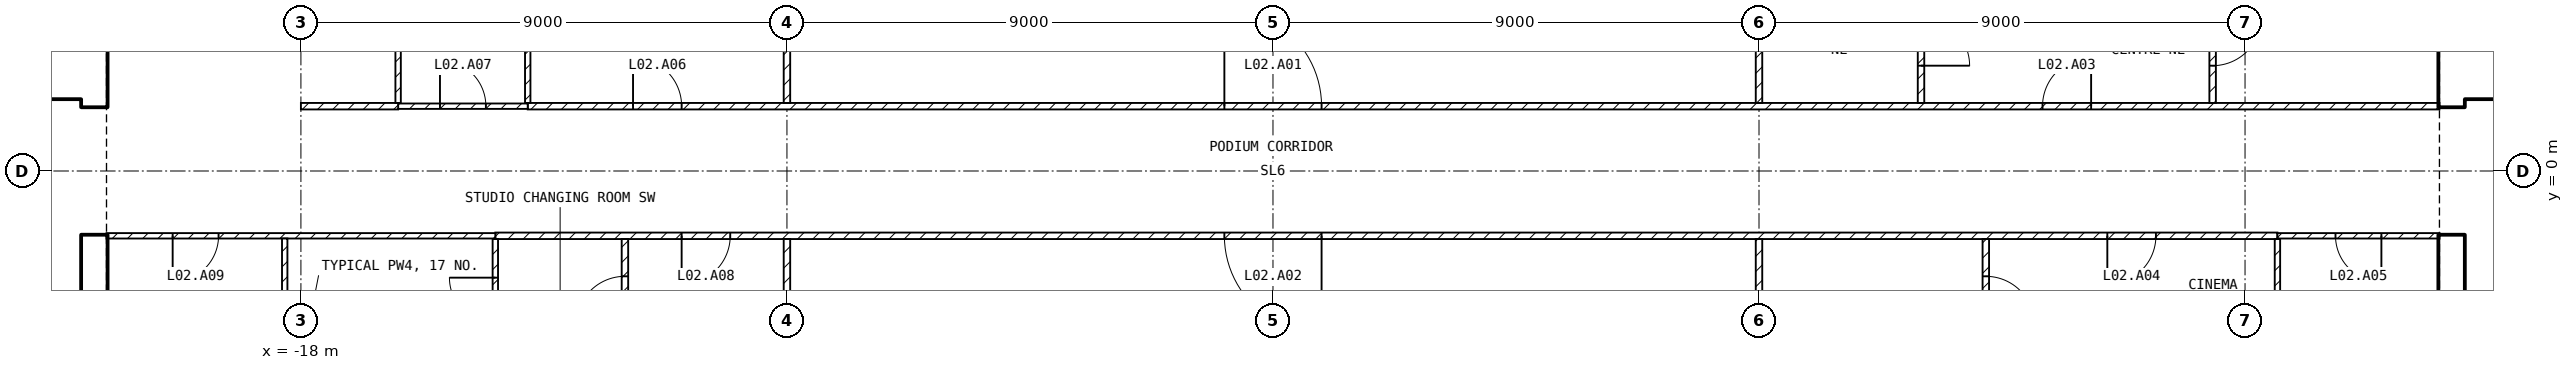
"""IFC4 building model, lengths in metres.
Left out: names, types, materials, properties, quantities, classifications, styles, units other than length and angle.
Written with IfcOpenShell. Run it as: python <this file> out.ifc"""

import sys

from ifc_helpers import new_model, si_unit, direction, frame, frame_2d, origin, place, context, subcontext, project, spatial, rectangle, extrude, element, fill, save


model = new_model("IFC4")
c1 = context("Model", 3, precision=1e-05, world=origin(), true_north=direction((0.0, 1.0)))
c2 = subcontext(c1, "Body", "Model", "MODEL_VIEW")
j1 = project(units=[si_unit("LENGTHUNIT", "METRE"), si_unit("PLANEANGLEUNIT", "RADIAN")], contexts=[c1])
p1 = place(None, origin())
s1 = spatial("IfcSite", under=j1, at=p1, CompositionType="ELEMENT")
p2 = place(p1, origin())
s2 = spatial("IfcBuilding", under=s1, at=p2, CompositionType="ELEMENT")
p3 = place(p2, frame((0.0, 0.0, 21.0)))
s3 = spatial("IfcBuildingStorey", under=s2, at=p3, CompositionType="ELEMENT", Elevation=21.0)
for number, where, z_axis, x_axis in (
    (1, (21.825, -8.1, 0.0), (0.0, 0.0, 1.0), (0.0, 1.0, 0.0)),
    (2, (21.825, 1.2, 0.0), (0.0, 0.0, 1.0), (0.0, 1.0, 0.0)),
):
    element("IfcWall", number, at=place(p3, frame(where, z_axis=z_axis, x_axis=x_axis)), inside=s3, PredefinedType="SHEAR", context=c2, shape_type="SweptSolid", body=[
        extrude(rectangle(XDim=6.9, YDim=0.45, at=frame_2d((3.45, 0.0))), origin(), (0.0, 0.0, 1.0), 5.55),
    ])
p4 = place(p3, frame((22.05, 1.45, 0.0), z_axis=(0.0, 0.0, 1.0), x_axis=(1.0, 0.0, 0.0)))
e3 = element("IfcWall", 3, at=p4, inside=s3, PredefinedType="SOLIDWALL", context=c2, shape_type="SweptSolid", body=[
    extrude(rectangle(XDim=13.05, YDim=0.2, at=frame_2d((6.525, 0.0))), origin(), (0.0, 0.0, 1.0), 5.55),
])
p5 = place(p4, frame((0.75, 0.0, 0.0)))
e4 = element("IfcOpeningElement", 4, at=p5, cuts=e3, PredefinedType="OPENING", context=c2, shape_type="SweptSolid", body=[
    extrude(rectangle(XDim=1.0, YDim=2.1, at=frame_2d((0.5, 1.05))), frame((0.0, 0.11, 0.0), z_axis=(0.0, -1.0, 0.0), x_axis=(1.0, 0.0, 0.0)), (0.0, 0.0, 1.0), 0.22),
])
p6 = place(p4, frame((3.25, 0.0, 0.0)))
e5 = element("IfcOpeningElement", 5, at=p6, cuts=e3, PredefinedType="OPENING", context=c2, shape_type="SweptSolid", body=[
    extrude(rectangle(XDim=1.0, YDim=2.1, at=frame_2d((0.5, 1.05))), frame((0.0, 0.11, 0.0), z_axis=(0.0, -1.0, 0.0), x_axis=(1.0, 0.0, 0.0)), (0.0, 0.0, 1.0), 0.22),
])
for number, where, z_axis, x_axis in (
    (6, (-21.825, -8.1, 0.0), (0.0, 0.0, 1.0), (0.0, 1.0, 0.0)),
    (7, (-21.825, 1.2, 0.0), (0.0, 0.0, 1.0), (0.0, 1.0, 0.0)),
):
    element("IfcWall", number, at=place(p3, frame(where, z_axis=z_axis, x_axis=x_axis)), inside=s3, PredefinedType="SHEAR", context=c2, shape_type="SweptSolid", body=[
        extrude(rectangle(XDim=6.9, YDim=0.45, at=frame_2d((3.45, 0.0))), origin(), (0.0, 0.0, 1.0), 5.55),
    ])
p7 = place(p3, frame((-35.1, 1.45, 0.0), z_axis=(0.0, 0.0, 1.0), x_axis=(1.0, 0.0, 0.0)))
e8 = element("IfcWall", 8, at=p7, inside=s3, PredefinedType="SOLIDWALL", context=c2, shape_type="SweptSolid", body=[
    extrude(rectangle(XDim=13.05, YDim=0.2, at=frame_2d((6.525, 0.0))), origin(), (0.0, 0.0, 1.0), 5.55),
])
p8 = place(p7, frame((11.3, 0.0, 0.0)))
e9 = element("IfcOpeningElement", 9, at=p8, cuts=e8, PredefinedType="OPENING", context=c2, shape_type="SweptSolid", body=[
    extrude(rectangle(XDim=1.0, YDim=2.1, at=frame_2d((0.5, 1.05))), frame((0.0, 0.11, 0.0), z_axis=(0.0, -1.0, 0.0), x_axis=(1.0, 0.0, 0.0)), (0.0, 0.0, 1.0), 0.22),
])
p9 = place(p7, frame((8.8, 0.0, 0.0)))
e10 = element("IfcOpeningElement", 10, at=p9, cuts=e8, PredefinedType="OPENING", context=c2, shape_type="SweptSolid", body=[
    extrude(rectangle(XDim=1.0, YDim=2.1, at=frame_2d((0.5, 1.05))), frame((0.0, 0.11, 0.0), z_axis=(0.0, -1.0, 0.0), x_axis=(1.0, 0.0, 0.0)), (0.0, 0.0, 1.0), 0.22),
])
p10 = place(p3, frame((-13.8, 1.2, 0.0), z_axis=(0.0, 0.0, 1.0), x_axis=(1.0, 0.0, 0.0)))
e11 = element("IfcWall", 11, at=p10, inside=s3, PredefinedType="PARTITIONING", context=c2, shape_type="SweptSolid", body=[
    extrude(rectangle(XDim=35.4, YDim=0.12, at=frame_2d((17.7, 0.0))), origin(), (0.0, 0.0, 1.0), 5.55),
])
p11 = place(p10, frame((12.9, 0.0, 0.0)))
e12 = element("IfcOpeningElement", 12, at=p11, cuts=e11, PredefinedType="OPENING", context=c2, shape_type="SweptSolid", body=[
    extrude(rectangle(XDim=1.8, YDim=2.1, at=frame_2d((0.9, 1.05))), frame((0.0, 0.07, 0.0), z_axis=(0.0, -1.0, 0.0), x_axis=(1.0, 0.0, 0.0)), (0.0, 0.0, 1.0), 0.14),
])
p12 = place(p10, frame((28.05, 0.0, 0.0)))
e13 = element("IfcOpeningElement", 13, at=p12, cuts=e11, PredefinedType="OPENING", context=c2, shape_type="SweptSolid", body=[
    extrude(rectangle(XDim=0.9, YDim=2.1, at=frame_2d((0.45, 1.05))), frame((0.0, 0.07, 0.0), z_axis=(0.0, -1.0, 0.0), x_axis=(1.0, 0.0, 0.0)), (0.0, 0.0, 1.0), 0.14),
])
p13 = place(p10, frame((1.95, 0.0, 0.0)))
e14 = element("IfcOpeningElement", 14, at=p13, cuts=e11, PredefinedType="OPENING", context=c2, shape_type="SweptSolid", body=[
    extrude(rectangle(XDim=0.9, YDim=2.1, at=frame_2d((0.45, 1.05))), frame((0.0, 0.07, 0.0), z_axis=(0.0, -1.0, 0.0), x_axis=(1.0, 0.0, 0.0)), (0.0, 0.0, 1.0), 0.14),
])
p14 = place(p3, frame((18.6, -1.2, 0.0), z_axis=(0.0, 0.0, 1.0), x_axis=(-1.0, 0.0, 0.0)))
e15 = element("IfcWall", 15, at=p14, inside=s3, PredefinedType="PARTITIONING", context=c2, shape_type="SweptSolid", body=[
    extrude(rectangle(XDim=33.0, YDim=0.12, at=frame_2d((16.5, 0.0))), origin(), (0.0, 0.0, 1.0), 5.55),
])
p15 = place(p14, frame((17.7, 0.0, 0.0)))
e16 = element("IfcOpeningElement", 16, at=p15, cuts=e15, PredefinedType="OPENING", context=c2, shape_type="SweptSolid", body=[
    extrude(rectangle(XDim=1.8, YDim=2.1, at=frame_2d((0.9, 1.05))), frame((0.0, 0.07, 0.0), z_axis=(0.0, -1.0, 0.0), x_axis=(1.0, 0.0, 0.0)), (0.0, 0.0, 1.0), 0.14),
])
p16 = place(p14, frame((2.25, 0.0, 0.0)))
e17 = element("IfcOpeningElement", 17, at=p16, cuts=e15, PredefinedType="OPENING", context=c2, shape_type="SweptSolid", body=[
    extrude(rectangle(XDim=0.9, YDim=2.1, at=frame_2d((0.45, 1.05))), frame((0.0, 0.07, 0.0), z_axis=(0.0, -1.0, 0.0), x_axis=(1.0, 0.0, 0.0)), (0.0, 0.0, 1.0), 0.14),
])
p17 = place(p14, frame((28.65, 0.0, 0.0)))
e18 = element("IfcOpeningElement", 18, at=p17, cuts=e15, PredefinedType="OPENING", context=c2, shape_type="SweptSolid", body=[
    extrude(rectangle(XDim=0.9, YDim=2.1, at=frame_2d((0.45, 1.05))), frame((0.0, 0.07, 0.0), z_axis=(0.0, -1.0, 0.0), x_axis=(1.0, 0.0, 0.0)), (0.0, 0.0, 1.0), 0.14),
])
p18 = place(p3, frame((21.6, -1.2, 0.0), z_axis=(0.0, 0.0, 1.0), x_axis=(-1.0, 0.0, 0.0)))
e19 = element("IfcWall", 19, at=p18, inside=s3, PredefinedType="PARTITIONING", context=c2, shape_type="SweptSolid", body=[
    extrude(rectangle(XDim=3.0, YDim=0.1, at=frame_2d((1.5, 0.0))), origin(), (0.0, 0.0, 1.0), 5.55),
])
p19 = place(p18, frame((1.075, 0.0, 0.0)))
e20 = element("IfcOpeningElement", 20, at=p19, cuts=e19, PredefinedType="OPENING", context=c2, shape_type="SweptSolid", body=[
    extrude(rectangle(XDim=0.85, YDim=2.1, at=frame_2d((0.425, 1.05))), frame((0.0, 0.06, 0.0), z_axis=(0.0, -1.0, 0.0), x_axis=(1.0, 0.0, 0.0)), (0.0, 0.0, 1.0), 0.12),
])
p20 = place(p3, frame((-16.2, 1.2, 0.0), z_axis=(0.0, 0.0, 1.0), x_axis=(1.0, 0.0, 0.0)))
e21 = element("IfcWall", 21, at=p20, inside=s3, PredefinedType="PARTITIONING", context=c2, shape_type="SweptSolid", body=[
    extrude(rectangle(XDim=2.4, YDim=0.1, at=frame_2d((1.2, 0.0))), origin(), (0.0, 0.0, 1.0), 5.55),
])
p21 = place(p20, frame((0.775, 0.0, 0.0)))
e22 = element("IfcOpeningElement", 22, at=p21, cuts=e21, PredefinedType="OPENING", context=c2, shape_type="SweptSolid", body=[
    extrude(rectangle(XDim=0.85, YDim=2.1, at=frame_2d((0.425, 1.05))), frame((0.0, 0.06, 0.0), z_axis=(0.0, -1.0, 0.0), x_axis=(1.0, 0.0, 0.0)), (0.0, 0.0, 1.0), 0.12),
])
p22 = place(p3, frame((-18.0, 1.2, 0.0), z_axis=(0.0, 0.0, 1.0), x_axis=(1.0, 0.0, 0.0)))
e23 = element("IfcWall", 23, at=p22, inside=s3, PredefinedType="PARTITIONING", context=c2, shape_type="SweptSolid", body=[
    extrude(rectangle(XDim=1.8, YDim=0.12, at=frame_2d((0.9, 0.0))), origin(), (0.0, 0.0, 1.0), 5.55),
])
p23 = place(p3, frame((-14.4, -1.2, 0.0), z_axis=(0.0, 0.0, 1.0), x_axis=(-1.0, 0.0, 0.0)))
e24 = element("IfcWall", 24, at=p23, inside=s3, PredefinedType="PARTITIONING", context=c2, shape_type="SweptSolid", body=[
    extrude(rectangle(XDim=7.2, YDim=0.1, at=frame_2d((3.6, 0.0))), origin(), (0.0, 0.0, 1.0), 5.55),
])
p24 = place(p23, frame((5.125, 0.0, 0.0)))
e25 = element("IfcOpeningElement", 25, at=p24, cuts=e24, PredefinedType="OPENING", context=c2, shape_type="SweptSolid", body=[
    extrude(rectangle(XDim=0.85, YDim=2.1, at=frame_2d((0.425, 1.05))), frame((0.0, 0.06, 0.0), z_axis=(0.0, -1.0, 0.0), x_axis=(1.0, 0.0, 0.0)), (0.0, 0.0, 1.0), 0.12),
])
p25 = place(p3, frame((9.0, 8.92, 0.0), z_axis=(0.0, 0.0, 1.0), x_axis=(0.0, -1.0, 0.0)))
e26 = element("IfcWall", 26, at=p25, inside=s3, PredefinedType="PARTITIONING", context=c2, shape_type="SweptSolid", body=[
    extrude(rectangle(XDim=7.66, YDim=0.12, at=frame_2d((3.83, 0.0))), origin(), (0.0, 0.0, 1.0), 5.55),
])
p26 = place(p3, frame((-9.0, 1.26, 0.0), z_axis=(0.0, 0.0, 1.0), x_axis=(0.0, 1.0, 0.0)))
e27 = element("IfcWall", 27, at=p26, inside=s3, PredefinedType="PARTITIONING", context=c2, shape_type="SweptSolid", body=[
    extrude(rectangle(XDim=7.66, YDim=0.12, at=frame_2d((3.83, 0.0))), origin(), (0.0, 0.0, 1.0), 5.55),
])
p27 = place(p26, frame((3.99, 0.0, 0.0)))
e28 = element("IfcOpeningElement", 28, at=p27, cuts=e27, PredefinedType="OPENING", context=c2, shape_type="SweptSolid", body=[
    extrude(rectangle(XDim=0.9, YDim=2.1, at=frame_2d((0.45, 1.05))), frame((0.0, 0.07, 0.0), z_axis=(0.0, -1.0, 0.0), x_axis=(1.0, 0.0, 0.0)), (0.0, 0.0, 1.0), 0.14),
])
p28 = place(p3, frame((9.0, -1.26, 0.0), z_axis=(0.0, 0.0, 1.0), x_axis=(0.0, -1.0, 0.0)))
e29 = element("IfcWall", 29, at=p28, inside=s3, PredefinedType="PARTITIONING", context=c2, shape_type="SweptSolid", body=[
    extrude(rectangle(XDim=7.66, YDim=0.12, at=frame_2d((3.83, 0.0))), origin(), (0.0, 0.0, 1.0), 5.55),
])
p29 = place(p3, frame((-9.0, -8.92, 0.0), z_axis=(0.0, 0.0, 1.0), x_axis=(0.0, 1.0, 0.0)))
e30 = element("IfcWall", 30, at=p29, inside=s3, PredefinedType="PARTITIONING", context=c2, shape_type="SweptSolid", body=[
    extrude(rectangle(XDim=7.66, YDim=0.12, at=frame_2d((3.83, 0.0))), origin(), (0.0, 0.0, 1.0), 5.55),
])
p30 = place(p29, frame((2.77, 0.0, 0.0)))
e31 = element("IfcOpeningElement", 31, at=p30, cuts=e30, PredefinedType="OPENING", context=c2, shape_type="SweptSolid", body=[
    extrude(rectangle(XDim=0.9, YDim=2.1, at=frame_2d((0.45, 1.05))), frame((0.0, 0.07, 0.0), z_axis=(0.0, -1.0, 0.0), x_axis=(1.0, 0.0, 0.0)), (0.0, 0.0, 1.0), 0.14),
])
p31 = place(p3, frame((12.0, 3.54, 0.0), z_axis=(0.0, 0.0, 1.0), x_axis=(0.0, -1.0, 0.0)))
e32 = element("IfcWall", 32, at=p31, inside=s3, PredefinedType="PARTITIONING", context=c2, shape_type="SweptSolid", body=[
    extrude(rectangle(XDim=2.28, YDim=0.12, at=frame_2d((1.14, 0.0))), origin(), (0.0, 0.0, 1.0), 5.55),
])
p32 = place(p31, frame((0.69, 0.0, 0.0)))
e33 = element("IfcOpeningElement", 33, at=p32, cuts=e32, PredefinedType="OPENING", context=c2, shape_type="SweptSolid", body=[
    extrude(rectangle(XDim=0.9, YDim=2.1, at=frame_2d((0.45, 1.05))), frame((0.0, 0.07, 0.0), z_axis=(0.0, -1.0, 0.0), x_axis=(1.0, 0.0, 0.0)), (0.0, 0.0, 1.0), 0.14),
])
p33 = place(p3, frame((17.4, 3.54, 0.0), z_axis=(0.0, 0.0, 1.0), x_axis=(0.0, -1.0, 0.0)))
e34 = element("IfcWall", 34, at=p33, inside=s3, PredefinedType="PARTITIONING", context=c2, shape_type="SweptSolid", body=[
    extrude(rectangle(XDim=2.28, YDim=0.12, at=frame_2d((1.14, 0.0))), origin(), (0.0, 0.0, 1.0), 5.55),
])
p34 = place(p33, frame((0.69, 0.0, 0.0)))
e35 = element("IfcOpeningElement", 35, at=p34, cuts=e34, PredefinedType="OPENING", context=c2, shape_type="SweptSolid", body=[
    extrude(rectangle(XDim=0.9, YDim=2.1, at=frame_2d((0.45, 1.05))), frame((0.0, 0.07, 0.0), z_axis=(0.0, -1.0, 0.0), x_axis=(1.0, 0.0, 0.0)), (0.0, 0.0, 1.0), 0.14),
])
p35 = place(p3, frame((13.2, -1.26, 0.0), z_axis=(0.0, 0.0, 1.0), x_axis=(0.0, -1.0, 0.0)))
e36 = element("IfcWall", 36, at=p35, inside=s3, PredefinedType="PARTITIONING", context=c2, shape_type="SweptSolid", body=[
    extrude(rectangle(XDim=2.28, YDim=0.12, at=frame_2d((1.14, 0.0))), origin(), (0.0, 0.0, 1.0), 4.857),
])
p36 = place(p35, frame((0.69, 0.0, 0.0)))
e37 = element("IfcOpeningElement", 37, at=p36, cuts=e36, PredefinedType="OPENING", context=c2, shape_type="SweptSolid", body=[
    extrude(rectangle(XDim=0.9, YDim=2.1, at=frame_2d((0.45, 1.05))), frame((0.0, 0.07, 0.0), z_axis=(0.0, -1.0, 0.0), x_axis=(1.0, 0.0, 0.0)), (0.0, 0.0, 1.0), 0.14),
])
p37 = place(p3, frame((18.6, -1.26, 0.0), z_axis=(0.0, 0.0, 1.0), x_axis=(0.0, -1.0, 0.0)))
e38 = element("IfcWall", 38, at=p37, inside=s3, PredefinedType="PARTITIONING", context=c2, shape_type="SweptSolid", body=[
    extrude(rectangle(XDim=2.28, YDim=0.1, at=frame_2d((1.14, 0.0))), origin(), (0.0, 0.0, 1.0), 5.55),
])
for number, where, z_axis, x_axis in (
    (39, (-13.8, 1.26, 0.0), (0.0, 0.0, 1.0), (0.0, 1.0, 0.0)),
    (40, (-16.2, 1.26, 0.0), (0.0, 0.0, 1.0), (0.0, 1.0, 0.0)),
):
    element("IfcWall", number, at=place(p3, frame(where, z_axis=z_axis, x_axis=x_axis)), inside=s3, PredefinedType="PARTITIONING", context=c2, shape_type="SweptSolid", body=[
        extrude(rectangle(XDim=2.88, YDim=0.1, at=frame_2d((1.44, 0.0))), origin(), (0.0, 0.0, 1.0), 5.55),
    ])
p38 = place(p3, frame((-12.0, -3.54, 0.0), z_axis=(0.0, 0.0, 1.0), x_axis=(0.0, 1.0, 0.0)))
e41 = element("IfcWall", 41, at=p38, inside=s3, PredefinedType="PARTITIONING", context=c2, shape_type="SweptSolid", body=[
    extrude(rectangle(XDim=2.28, YDim=0.12, at=frame_2d((1.14, 0.0))), origin(), (0.0, 0.0, 1.0), 5.55),
])
p39 = place(p38, frame((0.69, 0.0, 0.0)))
e42 = element("IfcOpeningElement", 42, at=p39, cuts=e41, PredefinedType="OPENING", context=c2, shape_type="SweptSolid", body=[
    extrude(rectangle(XDim=0.9, YDim=2.1, at=frame_2d((0.45, 1.05))), frame((0.0, 0.07, 0.0), z_axis=(0.0, -1.0, 0.0), x_axis=(1.0, 0.0, 0.0)), (0.0, 0.0, 1.0), 0.14),
])
p40 = place(p3, frame((-14.4, -3.54, 0.0), z_axis=(0.0, 0.0, 1.0), x_axis=(0.0, 1.0, 0.0)))
e43 = element("IfcWall", 43, at=p40, inside=s3, PredefinedType="PARTITIONING", context=c2, shape_type="SweptSolid", body=[
    extrude(rectangle(XDim=2.28, YDim=0.1, at=frame_2d((1.14, 0.0))), origin(), (0.0, 0.0, 1.0), 5.55),
])
p41 = place(p40, frame((0.715, 0.0, 0.0)))
e44 = element("IfcOpeningElement", 44, at=p41, cuts=e43, PredefinedType="OPENING", context=c2, shape_type="SweptSolid", body=[
    extrude(rectangle(XDim=0.85, YDim=2.1, at=frame_2d((0.425, 1.05))), frame((0.0, 0.06, 0.0), z_axis=(0.0, -1.0, 0.0), x_axis=(1.0, 0.0, 0.0)), (0.0, 0.0, 1.0), 0.12),
])
p42 = place(p3, frame((-18.3, -3.55, 0.0), z_axis=(0.0, 0.0, 1.0), x_axis=(0.0, 1.0, 0.0)))
e45 = element("IfcWall", 45, at=p42, inside=s3, PredefinedType="PARTITIONING", context=c2, shape_type="SweptSolid", body=[
    extrude(rectangle(XDim=2.3, YDim=0.1, at=frame_2d((1.15, 0.0))), origin(), (0.0, 0.0, 1.0), 5.55),
])
p43 = place(p11, origin())
e46 = element("IfcDoor", 46, at=p43, inside=s3, OperationType="SINGLE_SWING_LEFT", PredefinedType="DOOR", context=c2, shape_type="SweptSolid", body=[
    extrude(rectangle(XDim=1.8, YDim=2.1, at=frame_2d((0.9, 1.05))), frame((0.0, 0.025, 0.0), z_axis=(0.0, -1.0, 0.0), x_axis=(1.0, 0.0, 0.0)), (0.0, 0.0, 1.0), 0.05),
])
fill(e12, e46)
p44 = place(p15, origin())
e47 = element("IfcDoor", 47, at=p44, inside=s3, OperationType="SINGLE_SWING_LEFT", PredefinedType="DOOR", context=c2, shape_type="SweptSolid", body=[
    extrude(rectangle(XDim=1.8, YDim=2.1, at=frame_2d((0.9, 1.05))), frame((0.0, 0.025, 0.0), z_axis=(0.0, -1.0, 0.0), x_axis=(1.0, 0.0, 0.0)), (0.0, 0.0, 1.0), 0.05),
])
fill(e16, e47)
p45 = place(p12, origin())
e48 = element("IfcDoor", 48, at=p45, inside=s3, OperationType="SINGLE_SWING_RIGHT", PredefinedType="DOOR", context=c2, shape_type="SweptSolid", body=[
    extrude(rectangle(XDim=0.9, YDim=2.1, at=frame_2d((0.45, 1.05))), frame((0.0, 0.025, 0.0), z_axis=(0.0, -1.0, 0.0), x_axis=(1.0, 0.0, 0.0)), (0.0, 0.0, 1.0), 0.05),
])
fill(e13, e48)
p46 = place(p16, origin())
e49 = element("IfcDoor", 49, at=p46, inside=s3, OperationType="SINGLE_SWING_RIGHT", PredefinedType="DOOR", context=c2, shape_type="SweptSolid", body=[
    extrude(rectangle(XDim=0.9, YDim=2.1, at=frame_2d((0.45, 1.05))), frame((0.0, 0.025, 0.0), z_axis=(0.0, -1.0, 0.0), x_axis=(1.0, 0.0, 0.0)), (0.0, 0.0, 1.0), 0.05),
])
fill(e17, e49)
p47 = place(p19, origin())
e50 = element("IfcDoor", 50, at=p47, inside=s3, OperationType="SINGLE_SWING_LEFT", PredefinedType="DOOR", context=c2, shape_type="SweptSolid", body=[
    extrude(rectangle(XDim=0.85, YDim=2.1, at=frame_2d((0.425, 1.05))), frame((0.0, 0.025, 0.0), z_axis=(0.0, -1.0, 0.0), x_axis=(1.0, 0.0, 0.0)), (0.0, 0.0, 1.0), 0.05),
])
fill(e20, e50)
p48 = place(p13, origin())
e51 = element("IfcDoor", 51, at=p48, inside=s3, OperationType="SINGLE_SWING_LEFT", PredefinedType="DOOR", context=c2, shape_type="SweptSolid", body=[
    extrude(rectangle(XDim=0.9, YDim=2.1, at=frame_2d((0.45, 1.05))), frame((0.0, 0.025, 0.0), z_axis=(0.0, -1.0, 0.0), x_axis=(1.0, 0.0, 0.0)), (0.0, 0.0, 1.0), 0.05),
])
fill(e14, e51)
p49 = place(p21, origin())
e52 = element("IfcDoor", 52, at=p49, inside=s3, OperationType="SINGLE_SWING_LEFT", PredefinedType="DOOR", context=c2, shape_type="SweptSolid", body=[
    extrude(rectangle(XDim=0.85, YDim=2.1, at=frame_2d((0.425, 1.05))), frame((0.0, 0.025, 0.0), z_axis=(0.0, -1.0, 0.0), x_axis=(1.0, 0.0, 0.0)), (0.0, 0.0, 1.0), 0.05),
])
fill(e22, e52)
p50 = place(p17, origin())
e53 = element("IfcDoor", 53, at=p50, inside=s3, OperationType="SINGLE_SWING_RIGHT", PredefinedType="DOOR", context=c2, shape_type="SweptSolid", body=[
    extrude(rectangle(XDim=0.9, YDim=2.1, at=frame_2d((0.45, 1.05))), frame((0.0, 0.025, 0.0), z_axis=(0.0, -1.0, 0.0), x_axis=(1.0, 0.0, 0.0)), (0.0, 0.0, 1.0), 0.05),
])
fill(e18, e53)
p51 = place(p24, origin())
e54 = element("IfcDoor", 54, at=p51, inside=s3, OperationType="SINGLE_SWING_RIGHT", PredefinedType="DOOR", context=c2, shape_type="SweptSolid", body=[
    extrude(rectangle(XDim=0.85, YDim=2.1, at=frame_2d((0.425, 1.05))), frame((0.0, 0.025, 0.0), z_axis=(0.0, -1.0, 0.0), x_axis=(1.0, 0.0, 0.0)), (0.0, 0.0, 1.0), 0.05),
])
fill(e25, e54)
p52 = place(p32, origin())
e55 = element("IfcDoor", 55, at=p52, inside=s3, OperationType="SINGLE_SWING_RIGHT", PredefinedType="DOOR", context=c2, shape_type="SweptSolid", body=[
    extrude(rectangle(XDim=0.9, YDim=2.1, at=frame_2d((0.45, 1.05))), frame((0.0, 0.025, 0.0), z_axis=(0.0, -1.0, 0.0), x_axis=(1.0, 0.0, 0.0)), (0.0, 0.0, 1.0), 0.05),
])
fill(e33, e55)
p53 = place(p34, origin())
e56 = element("IfcDoor", 56, at=p53, inside=s3, OperationType="SINGLE_SWING_LEFT", PredefinedType="DOOR", context=c2, shape_type="SweptSolid", body=[
    extrude(rectangle(XDim=0.9, YDim=2.1, at=frame_2d((0.45, 1.05))), frame((0.0, 0.025, 0.0), z_axis=(0.0, -1.0, 0.0), x_axis=(1.0, 0.0, 0.0)), (0.0, 0.0, 1.0), 0.05),
])
fill(e35, e56)
p54 = place(p36, origin())
e57 = element("IfcDoor", 57, at=p54, inside=s3, OperationType="SINGLE_SWING_RIGHT", PredefinedType="DOOR", context=c2, shape_type="SweptSolid", body=[
    extrude(rectangle(XDim=0.9, YDim=2.1, at=frame_2d((0.45, 1.05))), frame((0.0, 0.025, 0.0), z_axis=(0.0, -1.0, 0.0), x_axis=(1.0, 0.0, 0.0)), (0.0, 0.0, 1.0), 0.05),
])
fill(e37, e57)
p55 = place(p39, origin())
e58 = element("IfcDoor", 58, at=p55, inside=s3, OperationType="SINGLE_SWING_LEFT", PredefinedType="DOOR", context=c2, shape_type="SweptSolid", body=[
    extrude(rectangle(XDim=0.9, YDim=2.1, at=frame_2d((0.45, 1.05))), frame((0.0, 0.025, 0.0), z_axis=(0.0, -1.0, 0.0), x_axis=(1.0, 0.0, 0.0)), (0.0, 0.0, 1.0), 0.05),
])
fill(e42, e58)
p56 = place(p41, origin())
e59 = element("IfcDoor", 59, at=p56, inside=s3, OperationType="SINGLE_SWING_RIGHT", PredefinedType="DOOR", context=c2, shape_type="SweptSolid", body=[
    extrude(rectangle(XDim=0.85, YDim=2.1, at=frame_2d((0.425, 1.05))), frame((0.0, 0.025, 0.0), z_axis=(0.0, -1.0, 0.0), x_axis=(1.0, 0.0, 0.0)), (0.0, 0.0, 1.0), 0.05),
])
fill(e44, e59)
save(model, sys.argv[1])
